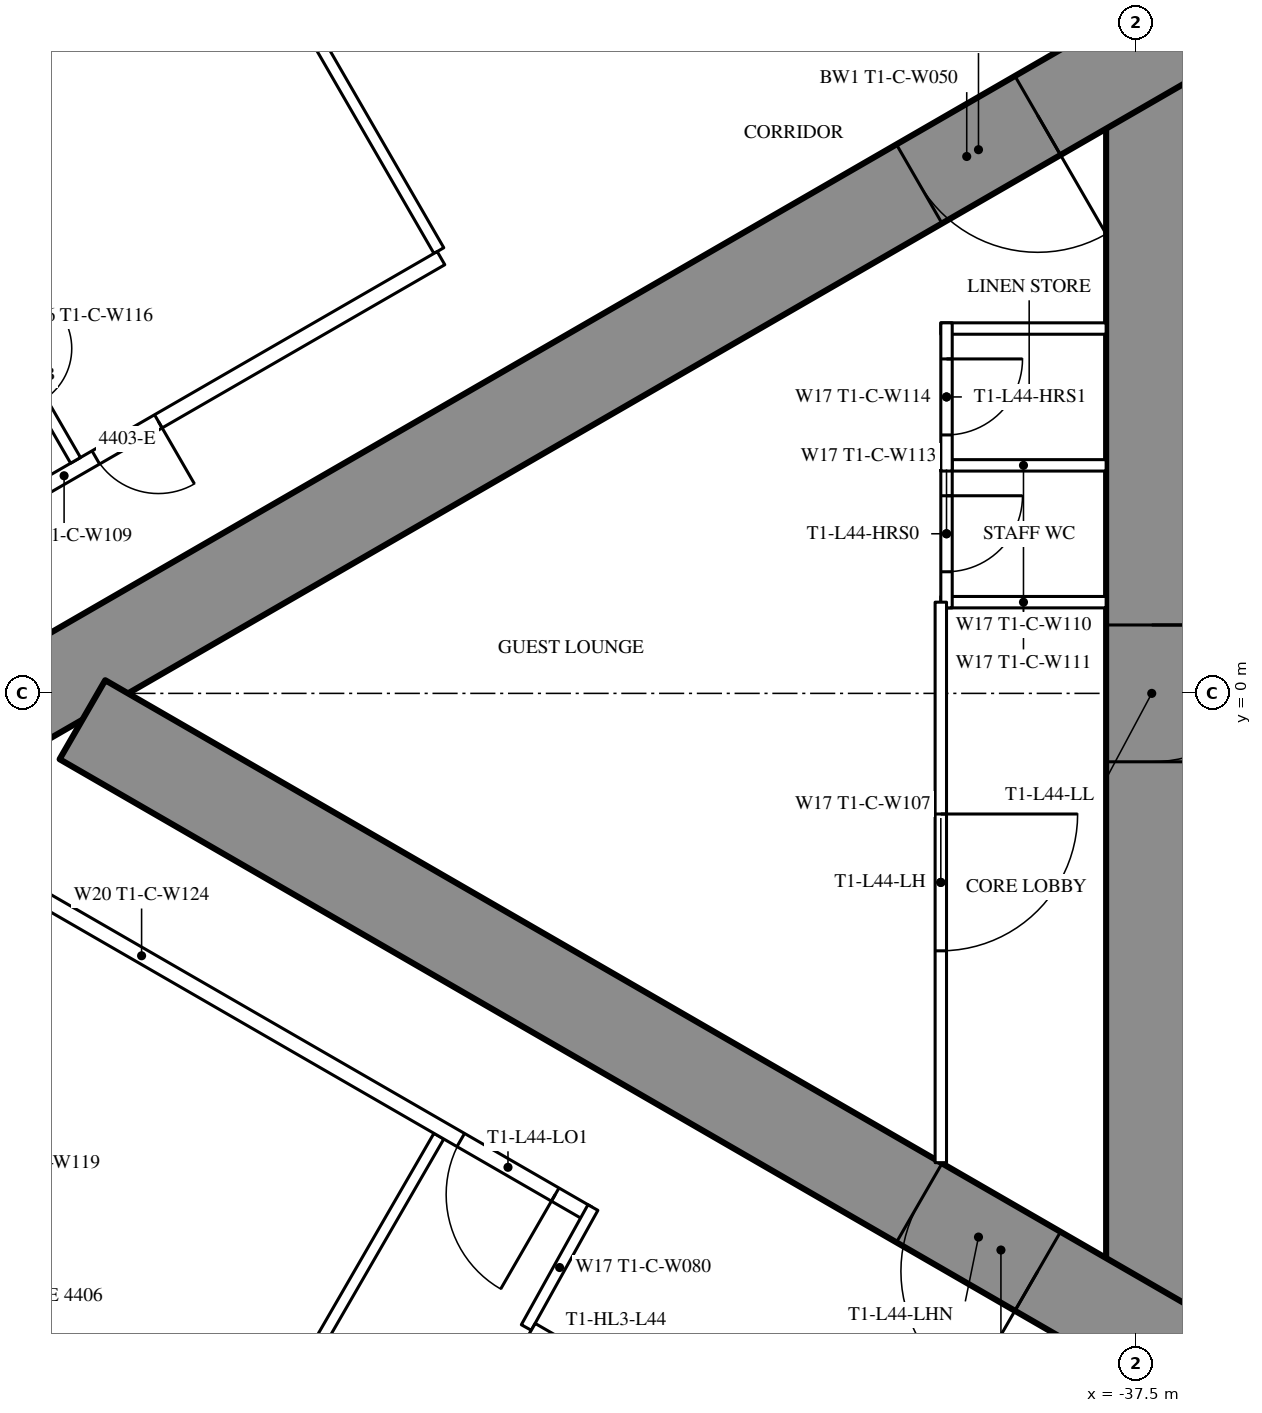
"""IFC4 building model, lengths in metres.
Left out: names, types, materials, properties, quantities, classifications, styles, units other than length and angle.
Written with IfcOpenShell. Run it as: python <this file> out.ifc"""

import sys

from ifc_helpers import new_model, si_unit, direction, frame, frame_2d, origin, place, context, subcontext, project, spatial, rectangle, extrude, element, fill, save


model = new_model("IFC4")
c1 = context("Model", 3, precision=1e-05, world=origin(), true_north=direction((0.0, 1.0)))
c2 = subcontext(c1, "Body", "Model", "MODEL_VIEW")
j1 = project(units=[si_unit("LENGTHUNIT", "METRE"), si_unit("PLANEANGLEUNIT", "RADIAN")], contexts=[c1])
p1 = place(None, origin())
s1 = spatial("IfcSite", under=j1, at=p1, CompositionType="ELEMENT")
p2 = place(p1, origin())
s2 = spatial("IfcBuilding", under=s1, at=p2, CompositionType="ELEMENT")
p3 = place(p2, frame((0.0, 0.0, 166.8)))
s3 = spatial("IfcBuildingStorey", under=s2, at=p3, CompositionType="ELEMENT", Elevation=166.8)
p4 = place(p3, frame((-37.3, 8.6, 0.0), z_axis=(0.0, 0.0, 1.0), x_axis=(0.0, -1.0, 0.0)))
e1 = element("IfcWall", 1, at=p4, inside=s3, PredefinedType="SHEAR", context=c2, shape_type="SweptSolid", body=[
    extrude(rectangle(XDim=17.2, YDim=1.2, at=frame_2d((8.6, 0.0))), origin(), (0.0, 0.0, 1.0), 3.5),
])
p5 = place(p4, frame((7.7, 0.0, 0.0)))
e2 = element("IfcOpeningElement", 2, at=p5, cuts=e1, PredefinedType="OPENING", context=c2, shape_type="SweptSolid", body=[
    extrude(rectangle(XDim=1.8, YDim=2.2, at=frame_2d((0.9, 1.1))), frame((0.0, 0.61, 0.0), z_axis=(0.0, -1.0, 0.0), x_axis=(1.0, 0.0, 0.0)), (0.0, 0.0, 1.0), 1.22),
])
p6 = place(p3, frame((-27.2, 14.3, 0.0), z_axis=(0.0, 0.0, 1.0), x_axis=(-0.866026593062, -0.499997940104, 0.0)))
e3 = element("IfcWall", 3, at=p6, inside=s3, PredefinedType="SHEAR", context=c2, shape_type="SweptSolid", body=[
    extrude(rectangle(XDim=28.946, YDim=1.2, at=frame_2d((14.473, 0.0))), origin(), (0.0, 0.0, 1.0), 3.5),
])
p7 = place(p6, frame((4.6, 0.0, 0.0)))
e4 = element("IfcOpeningElement", 4, at=p7, cuts=e3, PredefinedType="OPENING", context=c2, shape_type="SweptSolid", body=[
    extrude(rectangle(XDim=1.0, YDim=2.2, at=frame_2d((0.5, 1.1))), frame((0.0, 0.61, 0.0), z_axis=(0.0, -1.0, 0.0), x_axis=(1.0, 0.0, 0.0)), (0.0, 0.0, 1.0), 1.22),
])
p8 = place(p6, frame((13.395, 0.0, 0.0)))
e5 = element("IfcOpeningElement", 5, at=p8, cuts=e3, PredefinedType="OPENING", context=c2, shape_type="SweptSolid", body=[
    extrude(rectangle(XDim=1.8, YDim=2.2, at=frame_2d((0.9, 1.1))), frame((0.0, 0.61, 0.0), z_axis=(0.0, -1.0, 0.0), x_axis=(1.0, 0.0, 0.0)), (0.0, 0.0, 1.0), 1.22),
])
p9 = place(p3, frame((-27.2, -14.3, 0.0), z_axis=(0.0, 0.0, 1.0), x_axis=(-0.866024021859, 0.500002393557, 0.0)))
e6 = element("IfcWall", 6, at=p9, inside=s3, PredefinedType="SHEAR", context=c2, shape_type="SweptSolid", body=[
    extrude(rectangle(XDim=27.907, YDim=1.2, at=frame_2d((13.954, 0.0))), origin(), (0.0, 0.0, 1.0), 3.5),
])
p10 = place(p9, frame((4.6, 0.0, 0.0)))
e7 = element("IfcOpeningElement", 7, at=p10, cuts=e6, PredefinedType="OPENING", context=c2, shape_type="SweptSolid", body=[
    extrude(rectangle(XDim=1.0, YDim=2.2, at=frame_2d((0.5, 1.1))), frame((0.0, 0.61, 0.0), z_axis=(0.0, -1.0, 0.0), x_axis=(1.0, 0.0, 0.0)), (0.0, 0.0, 1.0), 1.22),
])
p11 = place(p9, frame((13.395, 0.0, 0.0)))
e8 = element("IfcOpeningElement", 8, at=p11, cuts=e6, PredefinedType="OPENING", context=c2, shape_type="SweptSolid", body=[
    extrude(rectangle(XDim=1.8, YDim=2.2, at=frame_2d((0.9, 1.1))), frame((0.0, 0.61, 0.0), z_axis=(0.0, -1.0, 0.0), x_axis=(1.0, 0.0, 0.0)), (0.0, 0.0, 1.0), 1.22),
])
for number, where, z_axis, x_axis in (
    (9, (-46.679, 5.825, 0.0), (0.0, 0.0, 1.0), (-0.5, 0.866, 0.0)),
    (10, (-46.679, -5.825, 0.0), (0.0, 0.0, 1.0), (-0.5, -0.866, 0.0)),
):
    element("IfcWall", number, at=place(p3, frame(where, z_axis=z_axis, x_axis=x_axis)), inside=s3, PredefinedType="PARTITIONING", context=c2, shape_type="SweptSolid", body=[
        extrude(rectangle(XDim=6.911, YDim=0.15, at=frame_2d((3.456, 0.0))), origin(), (0.0, 0.0, 1.0), 2.3),
    ])
p12 = place(p3, frame((-44.715, -6.844, 0.0), z_axis=(0.0, 0.0, 1.0), x_axis=(-0.866025261224, 0.500000246922, 0.0)))
e11 = element("IfcWall", 11, at=p12, inside=s3, PredefinedType="PARTITIONING", context=c2, shape_type="SweptSolid", body=[
    extrude(rectangle(XDim=13.567, YDim=0.2, at=frame_2d((6.783, 0.0))), origin(), (0.0, 0.0, 1.0), 3.25),
])
p13 = place(p12, frame((10.579, 0.0, 0.0)))
e12 = element("IfcOpeningElement", 12, at=p13, cuts=e11, PredefinedType="OPENING", context=c2, shape_type="SweptSolid", body=[
    extrude(rectangle(XDim=0.95, YDim=2.2, at=frame_2d((0.475, 1.1))), frame((0.0, 0.11, 0.0), z_axis=(0.0, -1.0, 0.0), x_axis=(1.0, 0.0, 0.0)), (0.0, 0.0, 1.0), 0.22),
])
p14 = place(p12, frame((8.879, 0.0, 0.0)))
e13 = element("IfcOpeningElement", 13, at=p14, cuts=e11, PredefinedType="OPENING", context=c2, shape_type="SweptSolid", body=[
    extrude(rectangle(XDim=0.95, YDim=2.2, at=frame_2d((0.475, 1.1))), frame((0.0, 0.11, 0.0), z_axis=(0.0, -1.0, 0.0), x_axis=(1.0, 0.0, 0.0)), (0.0, 0.0, 1.0), 0.22),
])
p15 = place(p12, frame((0.5, 0.0, 0.0)))
e14 = element("IfcOpeningElement", 14, at=p15, cuts=e11, PredefinedType="OPENING", context=c2, shape_type="SweptSolid", body=[
    extrude(rectangle(XDim=1.435, YDim=2.2, at=frame_2d((0.718, 1.1))), frame((0.0, 0.11, 0.0), z_axis=(0.0, -1.0, 0.0), x_axis=(1.0, 0.0, 0.0)), (0.0, 0.0, 1.0), 0.22),
])
p16 = place(p3, frame((-44.652, -6.764, 0.0), z_axis=(0.0, 0.0, 1.0), x_axis=(-0.485424724123, -0.874278466629, 0.0)))
e15 = element("IfcWall", 15, at=p16, inside=s3, PredefinedType="PARTITIONING", context=c2, shape_type="SweptSolid", body=[
    extrude(rectangle(XDim=1.805, YDim=0.15, at=frame_2d((0.903, 0.0))), origin(), (0.0, 0.0, 1.0), 3.25),
])
p17 = place(p3, frame((-46.65, 5.726, 0.0), z_axis=(0.0, 0.0, 1.0), x_axis=(-0.866027963864, -0.499995565786, 0.0)))
e16 = element("IfcWall", 16, at=p17, inside=s3, PredefinedType="PARTITIONING", context=c2, shape_type="SweptSolid", body=[
    extrude(rectangle(XDim=11.452, YDim=0.2, at=frame_2d((5.726, 0.0))), origin(), (0.0, 0.0, 1.0), 3.25),
])
p18 = place(p17, frame((4.294, 0.0, 0.0)))
e17 = element("IfcOpeningElement", 17, at=p18, cuts=e16, PredefinedType="OPENING", context=c2, shape_type="SweptSolid", body=[
    extrude(rectangle(XDim=0.95, YDim=2.2, at=frame_2d((0.475, 1.1))), frame((0.0, 0.11, 0.0), z_axis=(0.0, -1.0, 0.0), x_axis=(1.0, 0.0, 0.0)), (0.0, 0.0, 1.0), 0.22),
])
p19 = place(p17, frame((8.344, 0.0, 0.0)))
e18 = element("IfcOpeningElement", 18, at=p19, cuts=e16, PredefinedType="OPENING", context=c2, shape_type="SweptSolid", body=[
    extrude(rectangle(XDim=0.95, YDim=2.2, at=frame_2d((0.475, 1.1))), frame((0.0, 0.11, 0.0), z_axis=(0.0, -1.0, 0.0), x_axis=(1.0, 0.0, 0.0)), (0.0, 0.0, 1.0), 0.22),
])
p20 = place(p3, frame((-51.459, 3.065, 0.0), z_axis=(0.0, 0.0, 1.0), x_axis=(-0.499936506574, 0.866062058628, 0.0)))
e19 = element("IfcWall", 19, at=p20, inside=s3, PredefinedType="PARTITIONING", context=c2, shape_type="SweptSolid", body=[
    extrude(rectangle(XDim=2.6, YDim=0.15, at=frame_2d((1.3, 0.0))), origin(), (0.0, 0.0, 1.0), 3.25),
])
p21 = place(p20, frame((0.9, 0.0, 0.0)))
e20 = element("IfcOpeningElement", 20, at=p21, cuts=e19, PredefinedType="OPENING", context=c2, shape_type="SweptSolid", body=[
    extrude(rectangle(XDim=0.8, YDim=2.2, at=frame_2d((0.4, 1.1))), frame((0.0, 0.085, 0.0), z_axis=(0.0, -1.0, 0.0), x_axis=(1.0, 0.0, 0.0)), (0.0, 0.0, 1.0), 0.17),
])
for number, where, z_axis, x_axis in (
    (21, (-37.9, 1.2, 0.0), (0.0, 0.0, 1.0), (-1.0, 0.0, 0.0)),
    (22, (-37.9, 3.0, 0.0), (0.0, 0.0, 1.0), (-1.0, 0.0, 0.0)),
    (23, (-37.9, 4.8, 0.0), (0.0, 0.0, 1.0), (-1.0, 0.0, 0.0)),
):
    element("IfcWall", number, at=place(p3, frame(where, z_axis=z_axis, x_axis=x_axis)), inside=s3, PredefinedType="PARTITIONING", context=c2, shape_type="SweptSolid", body=[
        extrude(rectangle(XDim=2.175, YDim=0.15, at=frame_2d((1.087, 0.0))), origin(), (0.0, 0.0, 1.0), 3.25),
    ])
p22 = place(p3, frame((-40.0, 3.075, 0.0), z_axis=(0.0, 0.0, 1.0), x_axis=(0.0, -1.0, 0.0)))
e24 = element("IfcWall", 24, at=p22, inside=s3, PredefinedType="PARTITIONING", context=c2, shape_type="SweptSolid", body=[
    extrude(rectangle(XDim=1.95, YDim=0.15, at=frame_2d((0.975, 0.0))), origin(), (0.0, 0.0, 1.0), 3.25),
])
p23 = place(p22, frame((0.475, 0.0, 0.0)))
e25 = element("IfcOpeningElement", 25, at=p23, cuts=e24, PredefinedType="OPENING", context=c2, shape_type="SweptSolid", body=[
    extrude(rectangle(XDim=1.0, YDim=2.2, at=frame_2d((0.5, 1.1))), frame((0.0, 0.085, 0.0), z_axis=(0.0, -1.0, 0.0), x_axis=(1.0, 0.0, 0.0)), (0.0, 0.0, 1.0), 0.17),
])
p24 = place(p3, frame((-40.0, 4.875, 0.0), z_axis=(0.0, 0.0, 1.0), x_axis=(0.0, -1.0, 0.0)))
e26 = element("IfcWall", 26, at=p24, inside=s3, PredefinedType="PARTITIONING", context=c2, shape_type="SweptSolid", body=[
    extrude(rectangle(XDim=1.95, YDim=0.15, at=frame_2d((0.975, 0.0))), origin(), (0.0, 0.0, 1.0), 3.25),
])
p25 = place(p24, frame((0.475, 0.0, 0.0)))
e27 = element("IfcOpeningElement", 27, at=p25, cuts=e26, PredefinedType="OPENING", context=c2, shape_type="SweptSolid", body=[
    extrude(rectangle(XDim=1.0, YDim=2.2, at=frame_2d((0.5, 1.1))), frame((0.0, 0.085, 0.0), z_axis=(0.0, -1.0, 0.0), x_axis=(1.0, 0.0, 0.0)), (0.0, 0.0, 1.0), 0.17),
])
p26 = place(p3, frame((-40.075, 1.2, 0.0), z_axis=(0.0, 0.0, 1.0), x_axis=(0.0, -1.0, 0.0)))
e28 = element("IfcWall", 28, at=p26, inside=s3, PredefinedType="PARTITIONING", context=c2, shape_type="SweptSolid", body=[
    extrude(rectangle(XDim=7.374, YDim=0.15, at=frame_2d((3.687, 0.0))), origin(), (0.0, 0.0, 1.0), 3.25),
])
p27 = place(p26, frame((2.787, 0.0, 0.0)))
e29 = element("IfcOpeningElement", 29, at=p27, cuts=e28, PredefinedType="OPENING", context=c2, shape_type="SweptSolid", body=[
    extrude(rectangle(XDim=1.8, YDim=2.2, at=frame_2d((0.9, 1.1))), frame((0.0, 0.085, 0.0), z_axis=(0.0, -1.0, 0.0), x_axis=(1.0, 0.0, 0.0)), (0.0, 0.0, 1.0), 0.17),
])
p28 = place(p3, frame((-39.758, -11.697, 0.0), z_axis=(0.0, 0.0, 1.0), x_axis=(-0.866024194504, 0.500002094529, 0.0)))
e30 = element("IfcWall", 30, at=p28, inside=s3, PredefinedType="PARTITIONING", context=c2, shape_type="SweptSolid", body=[
    extrude(rectangle(XDim=6.6, YDim=0.25, at=frame_2d((3.3, 0.0))), origin(), (0.0, 0.0, 1.0), 3.25),
])
p29 = place(p28, frame((0.75, 0.0, 0.0)))
e31 = element("IfcOpeningElement", 31, at=p29, cuts=e30, PredefinedType="OPENING", context=c2, shape_type="SweptSolid", body=[
    extrude(rectangle(XDim=1.1, YDim=2.2, at=frame_2d((0.55, 1.1))), frame((0.0, 0.135, 0.0), z_axis=(0.0, -1.0, 0.0), x_axis=(1.0, 0.0, 0.0)), (0.0, 0.0, 1.0), 0.27),
])
p30 = place(p28, frame((2.75, 0.0, 0.0)))
e32 = element("IfcOpeningElement", 32, at=p30, cuts=e30, PredefinedType="OPENING", context=c2, shape_type="SweptSolid", body=[
    extrude(rectangle(XDim=1.1, YDim=2.2, at=frame_2d((0.55, 1.1))), frame((0.0, 0.135, 0.0), z_axis=(0.0, -1.0, 0.0), x_axis=(1.0, 0.0, 0.0)), (0.0, 0.0, 1.0), 0.27),
])
p31 = place(p28, frame((4.75, 0.0, 0.0)))
e33 = element("IfcOpeningElement", 33, at=p31, cuts=e30, PredefinedType="OPENING", context=c2, shape_type="SweptSolid", body=[
    extrude(rectangle(XDim=1.1, YDim=2.2, at=frame_2d((0.55, 1.1))), frame((0.0, 0.135, 0.0), z_axis=(0.0, -1.0, 0.0), x_axis=(1.0, 0.0, 0.0)), (0.0, 0.0, 1.0), 0.27),
])
p32 = place(p18, origin())
e34 = element("IfcDoor", 34, at=p32, inside=s3, OperationType="SINGLE_SWING_LEFT", PredefinedType="DOOR", context=c2, shape_type="SweptSolid", body=[
    extrude(rectangle(XDim=0.95, YDim=2.2, at=frame_2d((0.475, 1.1))), frame((0.0, 0.025, 0.0), z_axis=(0.0, -1.0, 0.0), x_axis=(1.0, 0.0, 0.0)), (0.0, 0.0, 1.0), 0.05),
])
fill(e17, e34)
p33 = place(p15, origin())
e35 = element("IfcDoor", 35, at=p33, inside=s3, OperationType="SINGLE_SWING_LEFT", PredefinedType="DOOR", context=c2, shape_type="SweptSolid", body=[
    extrude(rectangle(XDim=1.435, YDim=2.2, at=frame_2d((0.718, 1.1))), frame((0.0, 0.025, 0.0), z_axis=(0.0, -1.0, 0.0), x_axis=(1.0, 0.0, 0.0)), (0.0, 0.0, 1.0), 0.05),
])
fill(e14, e35)
p34 = place(p23, origin())
e36 = element("IfcDoor", 36, at=p34, inside=s3, OperationType="SINGLE_SWING_LEFT", PredefinedType="DOOR", context=c2, shape_type="SweptSolid", body=[
    extrude(rectangle(XDim=1.0, YDim=2.2, at=frame_2d((0.5, 1.1))), frame((0.0, 0.025, 0.0), z_axis=(0.0, -1.0, 0.0), x_axis=(1.0, 0.0, 0.0)), (0.0, 0.0, 1.0), 0.05),
])
fill(e25, e36)
p35 = place(p25, origin())
e37 = element("IfcDoor", 37, at=p35, inside=s3, OperationType="SINGLE_SWING_LEFT", PredefinedType="DOOR", context=c2, shape_type="SweptSolid", body=[
    extrude(rectangle(XDim=1.0, YDim=2.2, at=frame_2d((0.5, 1.1))), frame((0.0, 0.025, 0.0), z_axis=(0.0, -1.0, 0.0), x_axis=(1.0, 0.0, 0.0)), (0.0, 0.0, 1.0), 0.05),
])
fill(e27, e37)
p36 = place(p27, origin())
e38 = element("IfcDoor", 38, at=p36, inside=s3, OperationType="DOUBLE_DOOR_SINGLE_SWING", PredefinedType="DOOR", context=c2, shape_type="SweptSolid", body=[
    extrude(rectangle(XDim=1.8, YDim=2.2, at=frame_2d((0.9, 1.1))), frame((0.0, 0.025, 0.0), z_axis=(0.0, -1.0, 0.0), x_axis=(1.0, 0.0, 0.0)), (0.0, 0.0, 1.0), 0.05),
])
fill(e29, e38)
p37 = place(p8, origin())
e39 = element("IfcDoor", 39, at=p37, inside=s3, OperationType="DOUBLE_DOOR_SINGLE_SWING", PredefinedType="DOOR", context=c2, shape_type="SweptSolid", body=[
    extrude(rectangle(XDim=1.8, YDim=2.2, at=frame_2d((0.9, 1.1))), frame((0.0, 0.025, 0.0), z_axis=(0.0, -1.0, 0.0), x_axis=(1.0, 0.0, 0.0)), (0.0, 0.0, 1.0), 0.05),
])
fill(e5, e39)
p38 = place(p11, origin())
e40 = element("IfcDoor", 40, at=p38, inside=s3, OperationType="DOUBLE_DOOR_SINGLE_SWING", PredefinedType="DOOR", context=c2, shape_type="SweptSolid", body=[
    extrude(rectangle(XDim=1.8, YDim=2.2, at=frame_2d((0.9, 1.1))), frame((0.0, 0.025, 0.0), z_axis=(0.0, -1.0, 0.0), x_axis=(1.0, 0.0, 0.0)), (0.0, 0.0, 1.0), 0.05),
])
fill(e8, e40)
p39 = place(p5, origin())
e41 = element("IfcDoor", 41, at=p39, inside=s3, OperationType="DOUBLE_DOOR_SINGLE_SWING", PredefinedType="DOOR", context=c2, shape_type="SweptSolid", body=[
    extrude(rectangle(XDim=1.8, YDim=2.2, at=frame_2d((0.9, 1.1))), frame((0.0, 0.025, 0.0), z_axis=(0.0, -1.0, 0.0), x_axis=(1.0, 0.0, 0.0)), (0.0, 0.0, 1.0), 0.05),
])
fill(e2, e41)
save(model, sys.argv[1])
